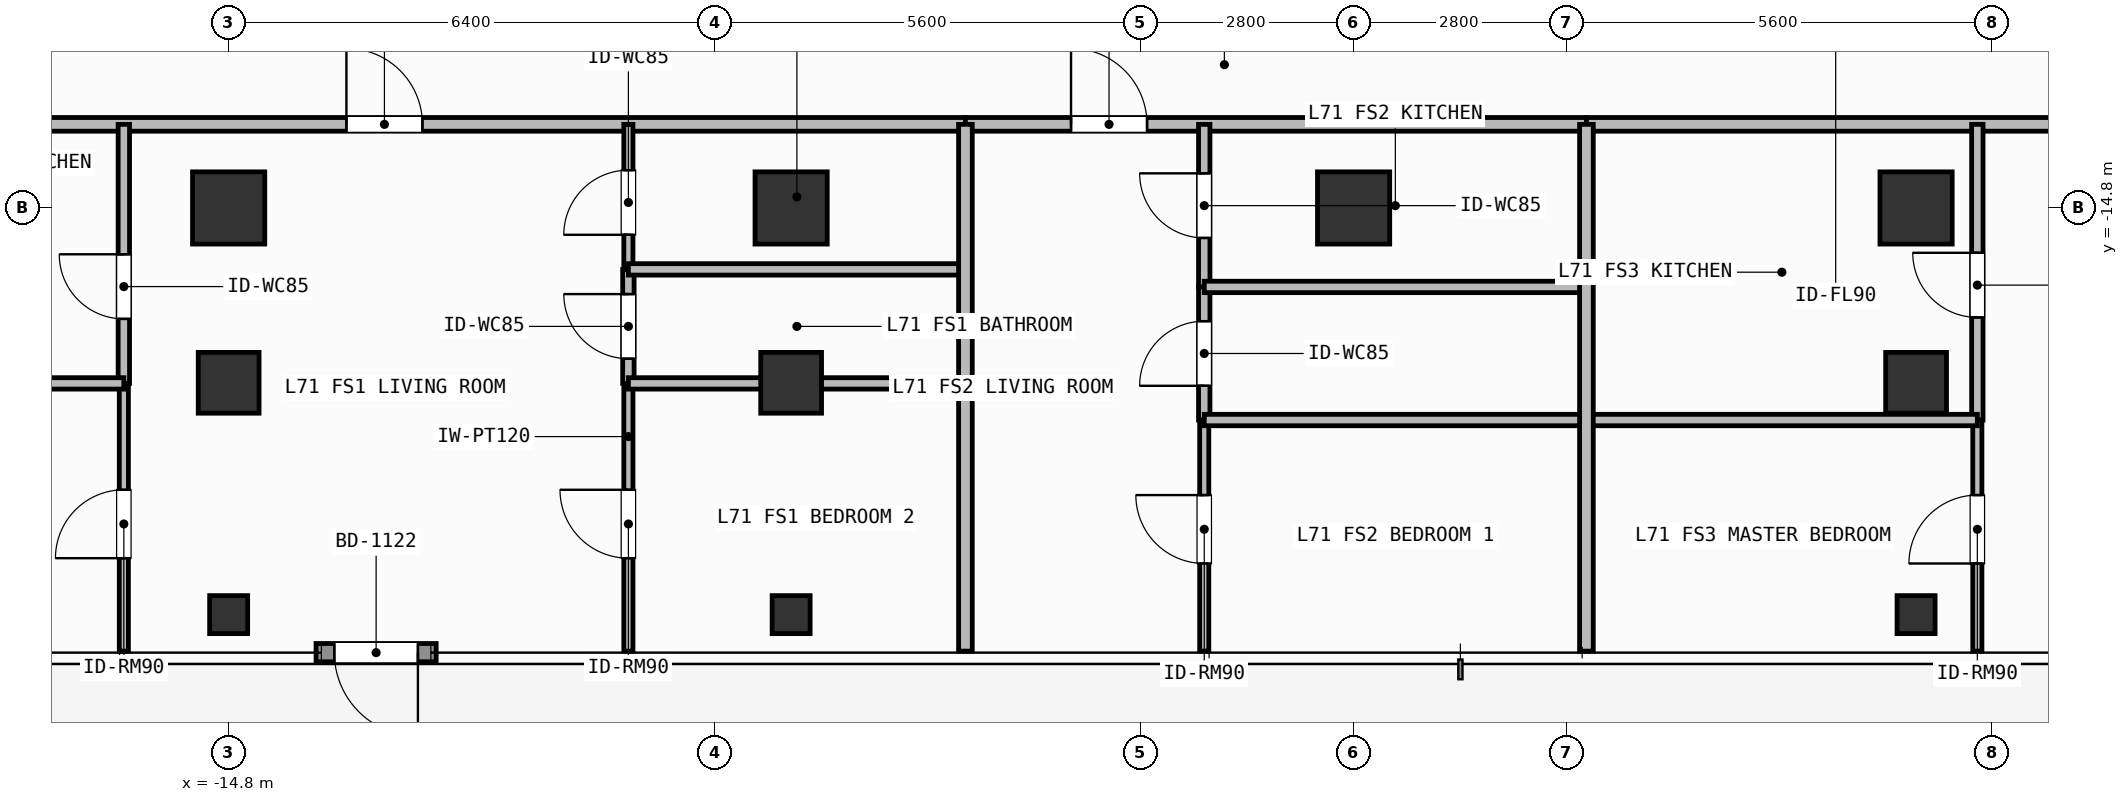
"""IFC4 building model, lengths in metres.
Left out: names, types, materials, properties, quantities, classifications, styles, units other than length and angle.
Written with IfcOpenShell. Run it as: python <this file> out.ifc"""

import sys

from ifc_helpers import new_model, si_unit, direction, frame, frame_2d, origin, origin_2d, place, context, subcontext, project, spatial, rectangle, hollow_rectangle, extrude, element, fill, save


model = new_model("IFC4")
c1 = context("Model", 3, precision=1e-05, world=origin(), true_north=direction((0.0, 1.0)))
c2 = subcontext(c1, "Body", "Model", "MODEL_VIEW")
j1 = project(units=[si_unit("LENGTHUNIT", "METRE"), si_unit("PLANEANGLEUNIT", "RADIAN")], contexts=[c1])
p1 = place(None, origin())
s1 = spatial("IfcSite", under=j1, at=p1, CompositionType="ELEMENT")
p2 = place(p1, origin())
s2 = spatial("IfcBuilding", under=s1, at=p2, CompositionType="ELEMENT")
p3 = place(p2, frame((0.0, 0.0, 289.8)))
s3 = spatial("IfcBuildingStorey", under=s2, at=p3, CompositionType="ELEMENT", Elevation=289.8)
for number, where, z_axis, x_axis in (
    (1, (-14.8, -14.8, 0.0), (0.0, 0.0, 1.0), (1.0, 0.0, 0.0)),
    (2, (-7.4, -14.8, 0.0), (0.0, 0.0, 1.0), (1.0, 0.0, 0.0)),
    (3, (0.0, -14.8, 0.0), (0.0, 0.0, 1.0), (1.0, 0.0, 0.0)),
    (4, (7.4, -14.8, 0.0), (0.0, 0.0, 1.0), (1.0, 0.0, 0.0)),
):
    element("IfcColumn", number, at=place(p3, frame(where, z_axis=z_axis, x_axis=x_axis)), inside=s3, PredefinedType="COLUMN", context=c2, shape_type="SweptSolid", body=[
        extrude(rectangle(XDim=0.95, YDim=0.95, at=origin_2d()), origin(), (0.0, 0.0, 1.0), 3.9),
    ])
for number, where, z_axis, x_axis in (
    (5, (-14.8, -17.1, 0.0), (0.0, 0.0, 1.0), (1.0, 0.0, 0.0)),
    (6, (-7.4, -17.1, 0.0), (0.0, 0.0, 1.0), (1.0, 0.0, 0.0)),
    (7, (7.4, -17.1, 0.0), (0.0, 0.0, 1.0), (1.0, 0.0, 0.0)),
):
    element("IfcColumn", number, at=place(p3, frame(where, z_axis=z_axis, x_axis=x_axis)), inside=s3, PredefinedType="COLUMN", context=c2, shape_type="SweptSolid", body=[
        extrude(hollow_rectangle(XDim=0.8, YDim=0.8, WallThickness=0.036, at=origin_2d()), origin(), (0.0, 0.0, 1.0), 3.9),
    ])
for number, where, z_axis, x_axis in (
    (8, (-14.8, -20.15, 0.0), (0.0, 0.0, 1.0), (1.0, 0.0, 0.0)),
    (9, (-7.4, -20.15, 0.0), (0.0, 0.0, 1.0), (1.0, 0.0, 0.0)),
    (10, (7.4, -20.15, 0.0), (0.0, 0.0, 1.0), (1.0, 0.0, 0.0)),
):
    element("IfcColumn", number, at=place(p3, frame(where, z_axis=z_axis, x_axis=x_axis)), inside=s3, PredefinedType="COLUMN", context=c2, shape_type="SweptSolid", body=[
        extrude(hollow_rectangle(XDim=0.5, YDim=0.5, WallThickness=0.025, at=origin_2d()), origin(), (0.0, 0.0, 1.0), 3.9),
    ])
p4 = place(p3, frame((-12.07, -20.65, 0.0), z_axis=(0.0, 0.0, 1.0), x_axis=(-1.0, 0.0, 0.0)))
e11 = element("IfcWall", 11, at=p4, inside=s3, PredefinedType="SOLIDWALL", context=c2, shape_type="SweptSolid", body=[
    extrude(rectangle(XDim=1.58, YDim=0.24, at=frame_2d((0.79, 0.0))), origin(), (0.0, 0.0, 1.0), 3.68),
])
p5 = place(p4, frame((0.24, 0.0, 0.0)))
e12 = element("IfcOpeningElement", 12, at=p5, cuts=e11, PredefinedType="OPENING", context=c2, shape_type="SweptSolid", body=[
    extrude(rectangle(XDim=1.1, YDim=2.2, at=frame_2d((0.55, 1.1))), frame((0.0, 0.13, 0.0), z_axis=(0.0, -1.0, 0.0), x_axis=(1.0, 0.0, 0.0)), (0.0, 0.0, 1.0), 0.26),
])
p6 = place(p3, frame((-19.32, -13.7, 0.0), z_axis=(0.0, 0.0, 1.0), x_axis=(1.0, 0.0, 0.0)))
e13 = element("IfcWall", 13, at=p6, inside=s3, PredefinedType="PARTITIONING", context=c2, shape_type="SweptSolid", body=[
    extrude(rectangle(XDim=14.213, YDim=0.18, at=frame_2d((7.106, 0.0))), origin(), (0.0, 0.0, 1.0), 3.68),
])
p7 = place(p6, frame((6.069, 0.0, 0.0)))
e14 = element("IfcOpeningElement", 14, at=p7, cuts=e13, PredefinedType="OPENING", context=c2, shape_type="SweptSolid", body=[
    extrude(rectangle(XDim=1.0, YDim=2.2, at=frame_2d((0.5, 1.1))), frame((0.0, 0.1, 0.0), z_axis=(0.0, -1.0, 0.0), x_axis=(1.0, 0.0, 0.0)), (0.0, 0.0, 1.0), 0.2),
])
p8 = place(p3, frame((-16.179, -17.108, 0.0), z_axis=(0.0, 0.0, 1.0), x_axis=(0.0, 1.0, 0.0)))
e15 = element("IfcWall", 15, at=p8, inside=s3, PredefinedType="PARTITIONING", context=c2, shape_type="SweptSolid", body=[
    extrude(rectangle(XDim=3.408, YDim=0.15, at=frame_2d((1.704, 0.0))), origin(), (0.0, 0.0, 1.0), 3.68),
])
p9 = place(p8, frame((0.849, 0.0, 0.0)))
e16 = element("IfcOpeningElement", 16, at=p9, cuts=e15, PredefinedType="OPENING", context=c2, shape_type="SweptSolid", body=[
    extrude(rectangle(XDim=0.85, YDim=2.1, at=frame_2d((0.425, 1.05))), frame((0.0, 0.085, 0.0), z_axis=(0.0, -1.0, 0.0), x_axis=(1.0, 0.0, 0.0)), (0.0, 0.0, 1.0), 0.17),
])
p10 = place(p3, frame((-16.179, -20.63, 0.0), z_axis=(0.0, 0.0, 1.0), x_axis=(0.0, 1.0, 0.0)))
e17 = element("IfcWall", 17, at=p10, inside=s3, PredefinedType="PARTITIONING", context=c2, shape_type="SweptSolid", body=[
    extrude(rectangle(XDim=3.522, YDim=0.12, at=frame_2d((1.761, 0.0))), origin(), (0.0, 0.0, 1.0), 3.68),
])
p11 = place(p10, frame((1.222, 0.0, 0.0)))
e18 = element("IfcOpeningElement", 18, at=p11, cuts=e17, PredefinedType="OPENING", context=c2, shape_type="SweptSolid", body=[
    extrude(rectangle(XDim=0.9, YDim=2.1, at=frame_2d((0.45, 1.05))), frame((0.0, 0.07, 0.0), z_axis=(0.0, -1.0, 0.0), x_axis=(1.0, 0.0, 0.0)), (0.0, 0.0, 1.0), 0.14),
])
p12 = place(p3, frame((-9.541, -17.108, 0.0), z_axis=(0.0, 0.0, 1.0), x_axis=(0.0, 1.0, 0.0)))
e19 = element("IfcWall", 19, at=p12, inside=s3, PredefinedType="PARTITIONING", context=c2, shape_type="SweptSolid", body=[
    extrude(rectangle(XDim=1.5, YDim=0.15, at=frame_2d((0.75, 0.0))), origin(), (0.0, 0.0, 1.0), 3.68),
])
p13 = place(p12, frame((0.325, 0.0, 0.0)))
e20 = element("IfcOpeningElement", 20, at=p13, cuts=e19, PredefinedType="OPENING", context=c2, shape_type="SweptSolid", body=[
    extrude(rectangle(XDim=0.85, YDim=2.1, at=frame_2d((0.425, 1.05))), frame((0.0, 0.085, 0.0), z_axis=(0.0, -1.0, 0.0), x_axis=(1.0, 0.0, 0.0)), (0.0, 0.0, 1.0), 0.17),
])
p14 = place(p3, frame((-9.541, -15.608, 0.0), z_axis=(0.0, 0.0, 1.0), x_axis=(0.0, 1.0, 0.0)))
e21 = element("IfcWall", 21, at=p14, inside=s3, PredefinedType="PARTITIONING", context=c2, shape_type="SweptSolid", body=[
    extrude(rectangle(XDim=1.908, YDim=0.12, at=frame_2d((0.954, 0.0))), origin(), (0.0, 0.0, 1.0), 3.68),
])
p15 = place(p14, frame((0.455, 0.0, 0.0)))
e22 = element("IfcOpeningElement", 22, at=p15, cuts=e21, PredefinedType="OPENING", context=c2, shape_type="SweptSolid", body=[
    extrude(rectangle(XDim=0.85, YDim=2.1, at=frame_2d((0.425, 1.05))), frame((0.0, 0.07, 0.0), z_axis=(0.0, -1.0, 0.0), x_axis=(1.0, 0.0, 0.0)), (0.0, 0.0, 1.0), 0.14),
])
p16 = place(p3, frame((-9.541, -20.63, 0.0), z_axis=(0.0, 0.0, 1.0), x_axis=(0.0, 1.0, 0.0)))
e23 = element("IfcWall", 23, at=p16, inside=s3, PredefinedType="PARTITIONING", context=c2, shape_type="SweptSolid", body=[
    extrude(rectangle(XDim=3.522, YDim=0.12, at=frame_2d((1.761, 0.0))), origin(), (0.0, 0.0, 1.0), 3.68),
])
p17 = place(p16, frame((1.222, 0.0, 0.0)))
e24 = element("IfcOpeningElement", 24, at=p17, cuts=e23, PredefinedType="OPENING", context=c2, shape_type="SweptSolid", body=[
    extrude(rectangle(XDim=0.9, YDim=2.1, at=frame_2d((0.45, 1.05))), frame((0.0, 0.07, 0.0), z_axis=(0.0, -1.0, 0.0), x_axis=(1.0, 0.0, 0.0)), (0.0, 0.0, 1.0), 0.14),
])
p18 = place(p3, frame((-5.107, -13.7, 0.0), z_axis=(0.0, 0.0, 1.0), x_axis=(1.0, 0.0, 0.0)))
e25 = element("IfcWall", 25, at=p18, inside=s3, PredefinedType="PARTITIONING", context=c2, shape_type="SweptSolid", body=[
    extrude(rectangle(XDim=8.17, YDim=0.18, at=frame_2d((4.085, 0.0))), origin(), (0.0, 0.0, 1.0), 3.68),
])
p19 = place(p18, frame((1.389, 0.0, 0.0)))
e26 = element("IfcOpeningElement", 26, at=p19, cuts=e25, PredefinedType="OPENING", context=c2, shape_type="SweptSolid", body=[
    extrude(rectangle(XDim=1.0, YDim=2.2, at=frame_2d((0.5, 1.1))), frame((0.0, 0.1, 0.0), z_axis=(0.0, -1.0, 0.0), x_axis=(1.0, 0.0, 0.0)), (0.0, 0.0, 1.0), 0.2),
])
p20 = place(p3, frame((-1.965, -15.839, 0.0), z_axis=(0.0, 0.0, 1.0), x_axis=(0.0, 1.0, 0.0)))
e27 = element("IfcWall", 27, at=p20, inside=s3, PredefinedType="PARTITIONING", context=c2, shape_type="SweptSolid", body=[
    extrude(rectangle(XDim=2.139, YDim=0.15, at=frame_2d((1.07, 0.0))), origin(), (0.0, 0.0, 1.0), 3.68),
])
p21 = place(p20, frame((0.645, 0.0, 0.0)))
e28 = element("IfcOpeningElement", 28, at=p21, cuts=e27, PredefinedType="OPENING", context=c2, shape_type="SweptSolid", body=[
    extrude(rectangle(XDim=0.85, YDim=2.1, at=frame_2d((0.425, 1.05))), frame((0.0, 0.085, 0.0), z_axis=(0.0, -1.0, 0.0), x_axis=(1.0, 0.0, 0.0)), (0.0, 0.0, 1.0), 0.17),
])
p22 = place(p3, frame((-1.965, -17.59, 0.0), z_axis=(0.0, 0.0, 1.0), x_axis=(0.0, 1.0, 0.0)))
e29 = element("IfcWall", 29, at=p22, inside=s3, PredefinedType="PARTITIONING", context=c2, shape_type="SweptSolid", body=[
    extrude(rectangle(XDim=1.751, YDim=0.15, at=frame_2d((0.875, 0.0))), origin(), (0.0, 0.0, 1.0), 3.68),
])
p23 = place(p22, frame((0.45, 0.0, 0.0)))
e30 = element("IfcOpeningElement", 30, at=p23, cuts=e29, PredefinedType="OPENING", context=c2, shape_type="SweptSolid", body=[
    extrude(rectangle(XDim=0.85, YDim=2.1, at=frame_2d((0.425, 1.05))), frame((0.0, 0.085, 0.0), z_axis=(0.0, -1.0, 0.0), x_axis=(1.0, 0.0, 0.0)), (0.0, 0.0, 1.0), 0.17),
])
p24 = place(p3, frame((-1.965, -20.63, 0.0), z_axis=(0.0, 0.0, 1.0), x_axis=(0.0, 1.0, 0.0)))
e31 = element("IfcWall", 31, at=p24, inside=s3, PredefinedType="PARTITIONING", context=c2, shape_type="SweptSolid", body=[
    extrude(rectangle(XDim=3.04, YDim=0.12, at=frame_2d((1.52, 0.0))), origin(), (0.0, 0.0, 1.0), 3.68),
])
p25 = place(p24, frame((1.153, 0.0, 0.0)))
e32 = element("IfcOpeningElement", 32, at=p25, cuts=e31, PredefinedType="OPENING", context=c2, shape_type="SweptSolid", body=[
    extrude(rectangle(XDim=0.9, YDim=2.1, at=frame_2d((0.45, 1.05))), frame((0.0, 0.07, 0.0), z_axis=(0.0, -1.0, 0.0), x_axis=(1.0, 0.0, 0.0)), (0.0, 0.0, 1.0), 0.14),
])
p26 = place(p3, frame((3.063, -13.7, 0.0), z_axis=(0.0, 0.0, 1.0), x_axis=(1.0, 0.0, 0.0)))
e33 = element("IfcWall", 33, at=p26, inside=s3, PredefinedType="PARTITIONING", context=c2, shape_type="SweptSolid", body=[
    extrude(rectangle(XDim=12.857, YDim=0.18, at=frame_2d((6.428, 0.0))), origin(), (0.0, 0.0, 1.0), 3.68),
])
p27 = place(p26, frame((6.372, 0.0, 0.0)))
e34 = element("IfcOpeningElement", 34, at=p27, cuts=e33, PredefinedType="OPENING", context=c2, shape_type="SweptSolid", body=[
    extrude(rectangle(XDim=1.0, YDim=2.2, at=frame_2d((0.5, 1.1))), frame((0.0, 0.1, 0.0), z_axis=(0.0, -1.0, 0.0), x_axis=(1.0, 0.0, 0.0)), (0.0, 0.0, 1.0), 0.2),
])
p28 = place(p3, frame((8.206, -17.59, 0.0), z_axis=(0.0, 0.0, 1.0), x_axis=(0.0, 1.0, 0.0)))
e35 = element("IfcWall", 35, at=p28, inside=s3, PredefinedType="PARTITIONING", context=c2, shape_type="SweptSolid", body=[
    extrude(rectangle(XDim=3.89, YDim=0.15, at=frame_2d((1.945, 0.0))), origin(), (0.0, 0.0, 1.0), 3.68),
])
p29 = place(p28, frame((1.35, 0.0, 0.0)))
e36 = element("IfcOpeningElement", 36, at=p29, cuts=e35, PredefinedType="OPENING", context=c2, shape_type="SweptSolid", body=[
    extrude(rectangle(XDim=0.85, YDim=2.1, at=frame_2d((0.425, 1.05))), frame((0.0, 0.085, 0.0), z_axis=(0.0, -1.0, 0.0), x_axis=(1.0, 0.0, 0.0)), (0.0, 0.0, 1.0), 0.17),
])
p30 = place(p3, frame((8.206, -20.63, 0.0), z_axis=(0.0, 0.0, 1.0), x_axis=(0.0, 1.0, 0.0)))
e37 = element("IfcWall", 37, at=p30, inside=s3, PredefinedType="PARTITIONING", context=c2, shape_type="SweptSolid", body=[
    extrude(rectangle(XDim=3.04, YDim=0.12, at=frame_2d((1.52, 0.0))), origin(), (0.0, 0.0, 1.0), 3.68),
])
p31 = place(p30, frame((1.153, 0.0, 0.0)))
e38 = element("IfcOpeningElement", 38, at=p31, cuts=e37, PredefinedType="OPENING", context=c2, shape_type="SweptSolid", body=[
    extrude(rectangle(XDim=0.9, YDim=2.1, at=frame_2d((0.45, 1.05))), frame((0.0, 0.07, 0.0), z_axis=(0.0, -1.0, 0.0), x_axis=(1.0, 0.0, 0.0)), (0.0, 0.0, 1.0), 0.14),
])
p32 = place(p3, frame((-19.32, -17.108, 0.0), z_axis=(0.0, 0.0, 1.0), x_axis=(1.0, 0.0, 0.0)))
e39 = element("IfcWall", 39, at=p32, inside=s3, PredefinedType="PARTITIONING", context=c2, shape_type="SweptSolid", body=[
    extrude(rectangle(XDim=3.141, YDim=0.15, at=frame_2d((1.571, 0.0))), origin(), (0.0, 0.0, 1.0), 3.68),
])
p33 = place(p3, frame((-9.541, -15.608, 0.0), z_axis=(0.0, 0.0, 1.0), x_axis=(1.0, 0.0, 0.0)))
e40 = element("IfcWall", 40, at=p33, inside=s3, PredefinedType="PARTITIONING", context=c2, shape_type="SweptSolid", body=[
    extrude(rectangle(XDim=4.434, YDim=0.15, at=frame_2d((2.217, 0.0))), origin(), (0.0, 0.0, 1.0), 3.68),
])
p34 = place(p3, frame((-9.541, -17.108, 0.0), z_axis=(0.0, 0.0, 1.0), x_axis=(1.0, 0.0, 0.0)))
e41 = element("IfcWall", 41, at=p34, inside=s3, PredefinedType="PARTITIONING", context=c2, shape_type="SweptSolid", body=[
    extrude(rectangle(XDim=4.434, YDim=0.15, at=frame_2d((2.217, 0.0))), origin(), (0.0, 0.0, 1.0), 3.182),
])
for number, where, z_axis, x_axis in (
    (42, (-1.965, -15.839, 0.0), (0.0, 0.0, 1.0), (1.0, 0.0, 0.0)),
    (43, (-1.965, -17.59, 0.0), (0.0, 0.0, 1.0), (1.0, 0.0, 0.0)),
):
    element("IfcWall", number, at=place(p3, frame(where, z_axis=z_axis, x_axis=x_axis)), inside=s3, PredefinedType="PARTITIONING", context=c2, shape_type="SweptSolid", body=[
        extrude(rectangle(XDim=5.028, YDim=0.15, at=frame_2d((2.514, 0.0))), origin(), (0.0, 0.0, 1.0), 3.68),
    ])
p35 = place(p3, frame((-5.107, -20.63, 0.0), z_axis=(0.0, 0.0, 1.0), x_axis=(0.0, 1.0, 0.0)))
e44 = element("IfcWall", 44, at=p35, inside=s3, PredefinedType="PARTITIONING", context=c2, shape_type="SweptSolid", body=[
    extrude(rectangle(XDim=6.93, YDim=0.18, at=frame_2d((3.465, 0.0))), origin(), (0.0, 0.0, 1.0), 3.68),
])
p36 = place(p3, frame((3.063, -17.59, 0.0), z_axis=(0.0, 0.0, 1.0), x_axis=(1.0, 0.0, 0.0)))
e45 = element("IfcWall", 45, at=p36, inside=s3, PredefinedType="PARTITIONING", context=c2, shape_type="SweptSolid", body=[
    extrude(rectangle(XDim=5.143, YDim=0.15, at=frame_2d((2.572, 0.0))), origin(), (0.0, 0.0, 1.0), 3.68),
])
p37 = place(p3, frame((3.063, -20.63, 0.0), z_axis=(0.0, 0.0, 1.0), x_axis=(0.0, 1.0, 0.0)))
e46 = element("IfcWall", 46, at=p37, inside=s3, PredefinedType="PARTITIONING", context=c2, shape_type="SweptSolid", body=[
    extrude(rectangle(XDim=6.93, YDim=0.18, at=frame_2d((3.465, 0.0))), origin(), (0.0, 0.0, 1.0), 3.68),
])
p38 = place(p5, origin())
e47 = element("IfcDoor", 47, at=p38, inside=s3, OperationType="SINGLE_SWING_LEFT", PredefinedType="DOOR", context=c2, shape_type="SweptSolid", body=[
    extrude(rectangle(XDim=1.1, YDim=2.2, at=frame_2d((0.55, 1.1))), frame((0.0, 0.025, 0.0), z_axis=(0.0, -1.0, 0.0), x_axis=(1.0, 0.0, 0.0)), (0.0, 0.0, 1.0), 0.05),
])
fill(e12, e47)
p39 = place(p7, origin())
e48 = element("IfcDoor", 48, at=p39, inside=s3, OperationType="SINGLE_SWING_LEFT", PredefinedType="DOOR", context=c2, shape_type="SweptSolid", body=[
    extrude(rectangle(XDim=1.0, YDim=2.2, at=frame_2d((0.5, 1.1))), frame((0.0, 0.025, 0.0), z_axis=(0.0, -1.0, 0.0), x_axis=(1.0, 0.0, 0.0)), (0.0, 0.0, 1.0), 0.05),
])
fill(e14, e48)
p40 = place(p9, origin())
e49 = element("IfcDoor", 49, at=p40, inside=s3, OperationType="SINGLE_SWING_RIGHT", PredefinedType="DOOR", context=c2, shape_type="SweptSolid", body=[
    extrude(rectangle(XDim=0.85, YDim=2.1, at=frame_2d((0.425, 1.05))), frame((0.0, 0.025, 0.0), z_axis=(0.0, -1.0, 0.0), x_axis=(1.0, 0.0, 0.0)), (0.0, 0.0, 1.0), 0.05),
])
fill(e16, e49)
p41 = place(p11, origin())
e50 = element("IfcDoor", 50, at=p41, inside=s3, OperationType="SINGLE_SWING_LEFT", PredefinedType="DOOR", context=c2, shape_type="SweptSolid", body=[
    extrude(rectangle(XDim=0.9, YDim=2.1, at=frame_2d((0.45, 1.05))), frame((0.0, 0.025, 0.0), z_axis=(0.0, -1.0, 0.0), x_axis=(1.0, 0.0, 0.0)), (0.0, 0.0, 1.0), 0.05),
])
fill(e18, e50)
p42 = place(p13, origin())
e51 = element("IfcDoor", 51, at=p42, inside=s3, OperationType="SINGLE_SWING_RIGHT", PredefinedType="DOOR", context=c2, shape_type="SweptSolid", body=[
    extrude(rectangle(XDim=0.85, YDim=2.1, at=frame_2d((0.425, 1.05))), frame((0.0, 0.025, 0.0), z_axis=(0.0, -1.0, 0.0), x_axis=(1.0, 0.0, 0.0)), (0.0, 0.0, 1.0), 0.05),
])
fill(e20, e51)
p43 = place(p15, origin())
e52 = element("IfcDoor", 52, at=p43, inside=s3, OperationType="SINGLE_SWING_LEFT", PredefinedType="DOOR", context=c2, shape_type="SweptSolid", body=[
    extrude(rectangle(XDim=0.85, YDim=2.1, at=frame_2d((0.425, 1.05))), frame((0.0, 0.025, 0.0), z_axis=(0.0, -1.0, 0.0), x_axis=(1.0, 0.0, 0.0)), (0.0, 0.0, 1.0), 0.05),
])
fill(e22, e52)
p44 = place(p17, origin())
e53 = element("IfcDoor", 53, at=p44, inside=s3, OperationType="SINGLE_SWING_RIGHT", PredefinedType="DOOR", context=c2, shape_type="SweptSolid", body=[
    extrude(rectangle(XDim=0.9, YDim=2.1, at=frame_2d((0.45, 1.05))), frame((0.0, 0.025, 0.0), z_axis=(0.0, -1.0, 0.0), x_axis=(1.0, 0.0, 0.0)), (0.0, 0.0, 1.0), 0.05),
])
fill(e24, e53)
p45 = place(p19, origin())
e54 = element("IfcDoor", 54, at=p45, inside=s3, OperationType="SINGLE_SWING_LEFT", PredefinedType="DOOR", context=c2, shape_type="SweptSolid", body=[
    extrude(rectangle(XDim=1.0, YDim=2.2, at=frame_2d((0.5, 1.1))), frame((0.0, 0.025, 0.0), z_axis=(0.0, -1.0, 0.0), x_axis=(1.0, 0.0, 0.0)), (0.0, 0.0, 1.0), 0.05),
])
fill(e26, e54)
p46 = place(p21, origin())
e55 = element("IfcDoor", 55, at=p46, inside=s3, OperationType="SINGLE_SWING_RIGHT", PredefinedType="DOOR", context=c2, shape_type="SweptSolid", body=[
    extrude(rectangle(XDim=0.85, YDim=2.1, at=frame_2d((0.425, 1.05))), frame((0.0, 0.025, 0.0), z_axis=(0.0, -1.0, 0.0), x_axis=(1.0, 0.0, 0.0)), (0.0, 0.0, 1.0), 0.05),
])
fill(e28, e55)
p47 = place(p23, origin())
e56 = element("IfcDoor", 56, at=p47, inside=s3, OperationType="SINGLE_SWING_LEFT", PredefinedType="DOOR", context=c2, shape_type="SweptSolid", body=[
    extrude(rectangle(XDim=0.85, YDim=2.1, at=frame_2d((0.425, 1.05))), frame((0.0, 0.025, 0.0), z_axis=(0.0, -1.0, 0.0), x_axis=(1.0, 0.0, 0.0)), (0.0, 0.0, 1.0), 0.05),
])
fill(e30, e56)
p48 = place(p25, origin())
e57 = element("IfcDoor", 57, at=p48, inside=s3, OperationType="SINGLE_SWING_RIGHT", PredefinedType="DOOR", context=c2, shape_type="SweptSolid", body=[
    extrude(rectangle(XDim=0.9, YDim=2.1, at=frame_2d((0.45, 1.05))), frame((0.0, 0.025, 0.0), z_axis=(0.0, -1.0, 0.0), x_axis=(1.0, 0.0, 0.0)), (0.0, 0.0, 1.0), 0.05),
])
fill(e32, e57)
p49 = place(p29, origin())
e58 = element("IfcDoor", 58, at=p49, inside=s3, OperationType="SINGLE_SWING_RIGHT", PredefinedType="DOOR", context=c2, shape_type="SweptSolid", body=[
    extrude(rectangle(XDim=0.85, YDim=2.1, at=frame_2d((0.425, 1.05))), frame((0.0, 0.025, 0.0), z_axis=(0.0, -1.0, 0.0), x_axis=(1.0, 0.0, 0.0)), (0.0, 0.0, 1.0), 0.05),
])
fill(e36, e58)
p50 = place(p31, origin())
e59 = element("IfcDoor", 59, at=p50, inside=s3, OperationType="SINGLE_SWING_LEFT", PredefinedType="DOOR", context=c2, shape_type="SweptSolid", body=[
    extrude(rectangle(XDim=0.9, YDim=2.1, at=frame_2d((0.45, 1.05))), frame((0.0, 0.025, 0.0), z_axis=(0.0, -1.0, 0.0), x_axis=(1.0, 0.0, 0.0)), (0.0, 0.0, 1.0), 0.05),
])
fill(e38, e59)
save(model, sys.argv[1])
